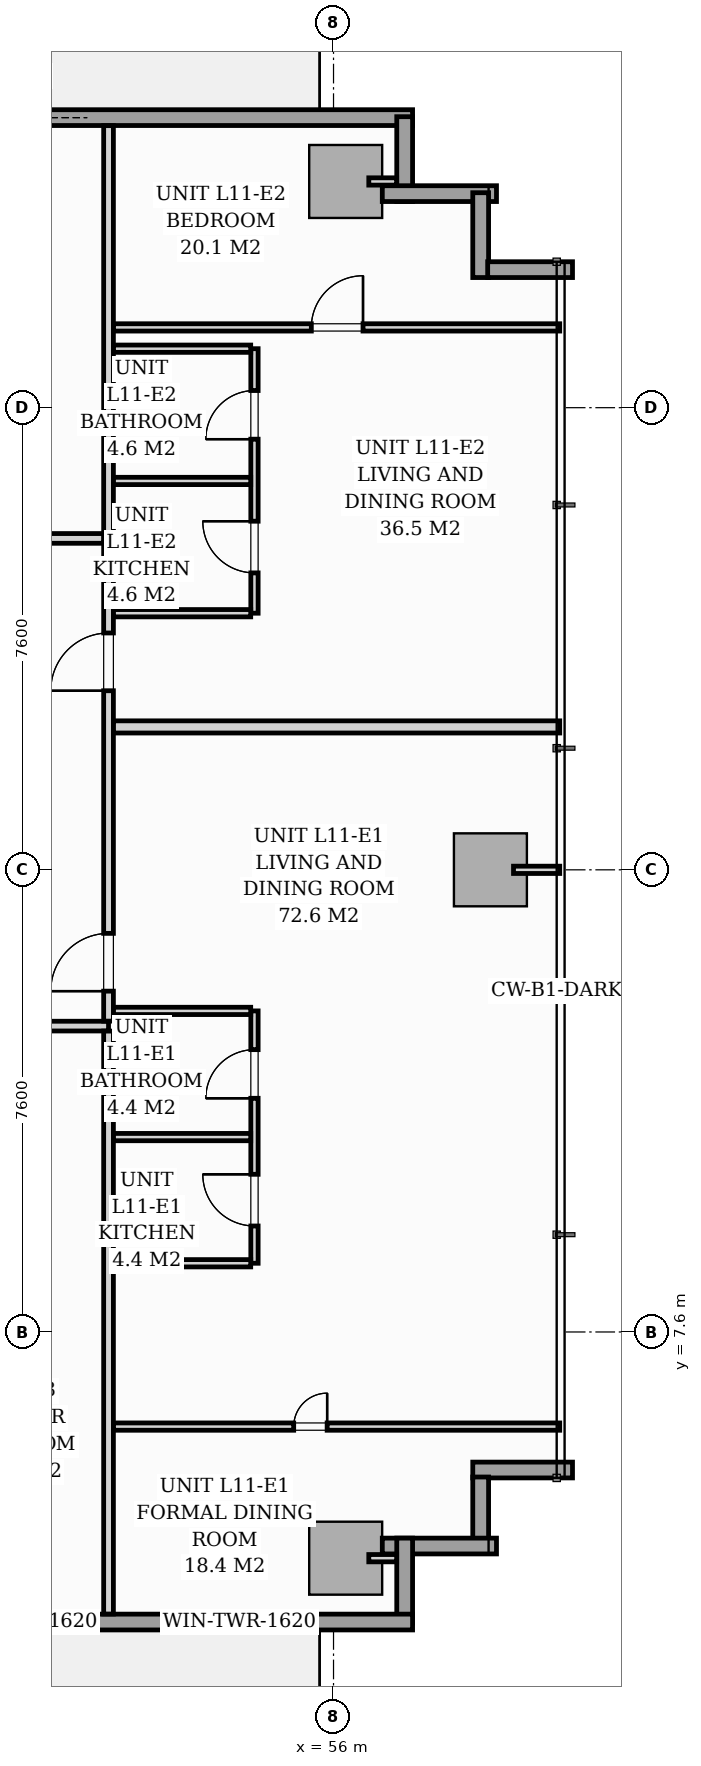
"""IFC4 building model, lengths in metres.
Left out: names, types, materials, properties, quantities, classifications, styles, units other than length and angle.
Written with IfcOpenShell. Run it as: python <this file> out.ifc"""

import sys

from ifc_helpers import new_model, si_unit, direction, frame, frame_2d, origin, origin_2d, place, context, subcontext, project, spatial, rectangle, extrude, source, transform, mapped, element, fill, save


model = new_model("IFC4")
c1 = context("Model", 3, precision=1e-05, world=origin(), true_north=direction((0.0, 1.0)))
c2 = subcontext(c1, "Body", "Model", "MODEL_VIEW")
j1 = project(units=[si_unit("LENGTHUNIT", "METRE"), si_unit("PLANEANGLEUNIT", "RADIAN")], contexts=[c1])
p1 = place(None, origin())
s1 = spatial("IfcSite", under=j1, at=p1, CompositionType="ELEMENT")
p2 = place(p1, origin())
s2 = spatial("IfcBuilding", under=s1, at=p2, CompositionType="ELEMENT")
p3 = place(p2, frame((0.0, 0.0, 42.2)))
s3 = spatial("IfcBuildingStorey", under=s2, at=p3, CompositionType="ELEMENT", Elevation=42.2)
m1 = source(origin(), c2, "Body", "SweptSolid", [
    extrude(rectangle(XDim=1.2, YDim=1.2, at=origin_2d()), origin(), (0.0, 0.0, 1.0), 3.196),
])
for number, where, z_axis, x_axis in (
    (1, (56.2, 3.88, 0.002), (0.0, 0.0, 1.0), (1.0, 0.0, 0.0)),
    (2, (56.2, 26.52, 0.002), (0.0, 0.0, 1.0), (1.0, 0.0, 0.0)),
    (3, (58.58, 15.2, 0.002), (0.0, 0.0, 1.0), (1.0, 0.0, 0.0)),
):
    element("IfcColumn", number, at=place(p3, frame(where, z_axis=z_axis, x_axis=x_axis)), inside=s3, PredefinedType="COLUMN", context=c2, shape_type="MappedRepresentation", body=[
        mapped(m1, transform((0.0, 0.0, 0.0), scale=1.0)),
    ])
p4 = place(p3, frame((40.15, 27.57, 0.0), z_axis=(0.0, 0.0, 1.0), x_axis=(1.0, 0.0, 0.0)))
e4 = element("IfcWall", 4, at=p4, inside=s3, PredefinedType="STANDARD", context=c2, shape_type="SweptSolid", body=[
    extrude(rectangle(XDim=17.15, YDim=0.26, at=frame_2d((8.575, 0.0))), origin(), (0.0, 0.0, 1.0), 2.94),
])
p5 = place(p4, frame((9.19, 0.0, 0.0)))
e5 = element("IfcOpeningElement", 5, at=p5, cuts=e4, PredefinedType="OPENING", context=c2, shape_type="SweptSolid", body=[
    extrude(rectangle(XDim=1.8, YDim=2.06, at=frame_2d((0.9, 1.03))), frame((0.0, 0.14, 0.0), z_axis=(0.0, -1.0, 0.0), x_axis=(1.0, 0.0, 0.0)), (0.0, 0.0, 1.0), 0.28),
])
p6 = place(p4, frame((0.7, 0.0, 0.65)))
e6 = element("IfcOpeningElement", 6, at=p6, cuts=e4, PredefinedType="OPENING", context=c2, shape_type="SweptSolid", body=[
    extrude(rectangle(XDim=1.6, YDim=1.5, at=frame_2d((0.8, 0.75))), frame((0.0, 0.14, 0.0), z_axis=(0.0, -1.0, 0.0), x_axis=(1.0, 0.0, 0.0)), (0.0, 0.0, 1.0), 0.28),
])
p7 = place(p3, frame((57.17, 27.585, 0.0), z_axis=(0.0, 0.0, 1.0), x_axis=(0.0, -1.0, 0.0)))
e7 = element("IfcWall", 7, at=p7, inside=s3, PredefinedType="STANDARD", context=c2, shape_type="SweptSolid", body=[
    extrude(rectangle(XDim=1.395, YDim=0.26, at=frame_2d((0.698, 0.0))), origin(), (0.0, 0.0, 1.0), 2.94),
])
p8 = place(p3, frame((56.802, 26.32, 0.0), z_axis=(0.0, 0.0, 1.0), x_axis=(1.0, 0.0, 0.0)))
e8 = element("IfcWall", 8, at=p8, inside=s3, PredefinedType="STANDARD", context=c2, shape_type="SweptSolid", body=[
    extrude(rectangle(XDim=1.878, YDim=0.26, at=frame_2d((0.939, 0.0))), origin(), (0.0, 0.0, 1.0), 2.94),
])
for number, where, z_axis, x_axis in (
    (9, (58.42, 26.335, 0.0), (0.0, 0.0, 1.0), (0.0, -1.0, 0.0)),
    (10, (58.535, 25.07, 0.0), (0.0, 0.0, 1.0), (1.0, 0.0, 0.0)),
):
    element("IfcWall", number, at=place(p3, frame(where, z_axis=z_axis, x_axis=x_axis)), inside=s3, PredefinedType="STANDARD", context=c2, shape_type="SweptSolid", body=[
        extrude(rectangle(XDim=1.395, YDim=0.26, at=frame_2d((0.698, 0.0))), origin(), (0.0, 0.0, 1.0), 2.94),
    ])
p9 = place(p3, frame((59.93, 5.33, 0.0), z_axis=(0.0, 0.0, 1.0), x_axis=(-1.0, 0.0, 0.0)))
e11 = element("IfcWall", 11, at=p9, inside=s3, PredefinedType="STANDARD", context=c2, shape_type="SweptSolid", body=[
    extrude(rectangle(XDim=1.64, YDim=0.26, at=frame_2d((0.82, 0.0))), origin(), (0.0, 0.0, 1.0), 2.94),
])
p10 = place(p3, frame((58.42, 5.215, 0.0), z_axis=(0.0, 0.0, 1.0), x_axis=(0.0, -1.0, 0.0)))
e12 = element("IfcWall", 12, at=p10, inside=s3, PredefinedType="STANDARD", context=c2, shape_type="SweptSolid", body=[
    extrude(rectangle(XDim=1.15, YDim=0.26, at=frame_2d((0.575, 0.0))), origin(), (0.0, 0.0, 1.0), 2.94),
])
p11 = place(p3, frame((58.68, 4.08, 0.0), z_axis=(0.0, 0.0, 1.0), x_axis=(-1.0, 0.0, 0.0)))
e13 = element("IfcWall", 13, at=p11, inside=s3, PredefinedType="STANDARD", context=c2, shape_type="SweptSolid", body=[
    extrude(rectangle(XDim=1.878, YDim=0.26, at=frame_2d((0.939, 0.0))), origin(), (0.0, 0.0, 1.0), 2.94),
])
p12 = place(p3, frame((57.17, 4.21, 0.0), z_axis=(0.0, 0.0, 1.0), x_axis=(0.0, -1.0, 0.0)))
e14 = element("IfcWall", 14, at=p12, inside=s3, PredefinedType="STANDARD", context=c2, shape_type="SweptSolid", body=[
    extrude(rectangle(XDim=1.395, YDim=0.26, at=frame_2d((0.698, 0.0))), origin(), (0.0, 0.0, 1.0), 2.94),
])
p13 = place(p3, frame((57.3, 2.83, 0.0), z_axis=(0.0, 0.0, 1.0), x_axis=(-1.0, 0.0, 0.0)))
e15 = element("IfcWall", 15, at=p13, inside=s3, PredefinedType="STANDARD", context=c2, shape_type="SweptSolid", body=[
    extrude(rectangle(XDim=17.15, YDim=0.26, at=frame_2d((8.575, 0.0))), origin(), (0.0, 0.0, 1.0), 2.94),
])
p14 = place(p13, frame((8.308, 0.0, 0.0)))
e16 = element("IfcOpeningElement", 16, at=p14, cuts=e15, PredefinedType="OPENING", context=c2, shape_type="SweptSolid", body=[
    extrude(rectangle(XDim=1.8, YDim=2.06, at=frame_2d((0.9, 1.03))), frame((0.0, 0.14, 0.0), z_axis=(0.0, -1.0, 0.0), x_axis=(1.0, 0.0, 0.0)), (0.0, 0.0, 1.0), 0.28),
])
p15 = place(p13, frame((2.05, 0.0, 0.65)))
e17 = element("IfcOpeningElement", 17, at=p15, cuts=e15, PredefinedType="OPENING", context=c2, shape_type="SweptSolid", body=[
    extrude(rectangle(XDim=1.6, YDim=1.5, at=frame_2d((0.8, 0.75))), frame((0.0, 0.14, 0.0), z_axis=(0.0, -1.0, 0.0), x_axis=(1.0, 0.0, 0.0)), (0.0, 0.0, 1.0), 0.28),
])
p16 = place(p13, frame((5.644, 0.0, 0.75)))
e18 = element("IfcOpeningElement", 18, at=p16, cuts=e15, PredefinedType="OPENING", context=c2, shape_type="SweptSolid", body=[
    extrude(rectangle(XDim=1.6, YDim=1.5, at=frame_2d((0.8, 0.75))), frame((0.0, 0.14, 0.0), z_axis=(0.0, -1.0, 0.0), x_axis=(1.0, 0.0, 0.0)), (0.0, 0.0, 1.0), 0.28),
])
p17 = place(p3, frame((15.2, 12.63, 0.0), z_axis=(0.0, 0.0, 1.0), x_axis=(1.0, 0.0, 0.0)))
e19 = element("IfcWall", 19, at=p17, inside=s3, PredefinedType="PARTITIONING", context=c2, shape_type="SweptSolid", body=[
    extrude(rectangle(XDim=37.1, YDim=0.16, at=frame_2d((18.55, 0.0))), origin(), (0.0, 0.0, 1.0), 2.94),
])
p18 = place(p17, frame((1.572, 0.0, 0.0)))
e20 = element("IfcOpeningElement", 20, at=p18, cuts=e19, PredefinedType="OPENING", context=c2, shape_type="SweptSolid", body=[
    extrude(rectangle(XDim=0.95, YDim=2.06, at=frame_2d((0.475, 1.03))), frame((0.0, 0.09, 0.0), z_axis=(0.0, -1.0, 0.0), x_axis=(1.0, 0.0, 0.0)), (0.0, 0.0, 1.0), 0.18),
])
p19 = place(p17, frame((14.877, 0.0, 0.0)))
e21 = element("IfcOpeningElement", 21, at=p19, cuts=e19, PredefinedType="OPENING", context=c2, shape_type="SweptSolid", body=[
    extrude(rectangle(XDim=0.95, YDim=2.06, at=frame_2d((0.475, 1.03))), frame((0.0, 0.09, 0.0), z_axis=(0.0, -1.0, 0.0), x_axis=(1.0, 0.0, 0.0)), (0.0, 0.0, 1.0), 0.18),
])
p20 = place(p17, frame((28.476, 0.0, 0.0)))
e22 = element("IfcOpeningElement", 22, at=p20, cuts=e19, PredefinedType="OPENING", context=c2, shape_type="SweptSolid", body=[
    extrude(rectangle(XDim=0.95, YDim=2.06, at=frame_2d((0.475, 1.03))), frame((0.0, 0.09, 0.0), z_axis=(0.0, -1.0, 0.0), x_axis=(1.0, 0.0, 0.0)), (0.0, 0.0, 1.0), 0.18),
])
p21 = place(p3, frame((52.3, 2.962, 0.0), z_axis=(0.0, 0.0, 1.0), x_axis=(0.0, 1.0, 0.0)))
e23 = element("IfcWall", 23, at=p21, inside=s3, PredefinedType="PARTITIONING", context=c2, shape_type="SweptSolid", body=[
    extrude(rectangle(XDim=9.586, YDim=0.16, at=frame_2d((4.793, 0.0))), origin(), (0.0, 0.0, 1.0), 2.94),
])
p22 = place(p3, frame((52.3, 12.712, 0.0), z_axis=(0.0, 0.0, 1.0), x_axis=(0.0, 1.0, 0.0)))
e24 = element("IfcWall", 24, at=p22, inside=s3, PredefinedType="PARTITIONING", context=c2, shape_type="SweptSolid", body=[
    extrude(rectangle(XDim=14.726, YDim=0.16, at=frame_2d((7.363, 0.0))), origin(), (0.0, 0.0, 1.0), 2.94),
])
p23 = place(p22, frame((0.493, 0.0, 0.0)))
e25 = element("IfcOpeningElement", 25, at=p23, cuts=e24, PredefinedType="OPENING", context=c2, shape_type="SweptSolid", body=[
    extrude(rectangle(XDim=0.95, YDim=2.06, at=frame_2d((0.475, 1.03))), frame((0.0, 0.09, 0.0), z_axis=(0.0, -1.0, 0.0), x_axis=(1.0, 0.0, 0.0)), (0.0, 0.0, 1.0), 0.18),
])
p24 = place(p22, frame((5.433, 0.0, 0.0)))
e26 = element("IfcOpeningElement", 26, at=p24, cuts=e24, PredefinedType="OPENING", context=c2, shape_type="SweptSolid", body=[
    extrude(rectangle(XDim=0.95, YDim=2.06, at=frame_2d((0.475, 1.03))), frame((0.0, 0.09, 0.0), z_axis=(0.0, -1.0, 0.0), x_axis=(1.0, 0.0, 0.0)), (0.0, 0.0, 1.0), 0.18),
])
p25 = place(p3, frame((52.382, 17.55, 0.0), z_axis=(0.0, 0.0, 1.0), x_axis=(1.0, 0.0, 0.0)))
e27 = element("IfcWall", 27, at=p25, inside=s3, PredefinedType="PARTITIONING", context=c2, shape_type="SweptSolid", body=[
    extrude(rectangle(XDim=7.338, YDim=0.2, at=frame_2d((3.669, 0.0))), origin(), (0.0, 0.0, 1.0), 2.94),
])
p26 = place(p3, frame((54.7, 8.73, 0.0), z_axis=(0.0, 0.0, 1.0), x_axis=(0.0, 1.0, 0.0)))
e28 = element("IfcWall", 28, at=p26, inside=s3, PredefinedType="PARTITIONING", context=c2, shape_type="SweptSolid", body=[
    extrude(rectangle(XDim=4.15, YDim=0.12, at=frame_2d((2.075, 0.0))), origin(), (0.0, 0.0, 1.0), 2.94),
])
p27 = place(p26, frame((0.613, 0.0, 0.0)))
e29 = element("IfcOpeningElement", 29, at=p27, cuts=e28, PredefinedType="OPENING", context=c2, shape_type="SweptSolid", body=[
    extrude(rectangle(XDim=0.85, YDim=2.05, at=frame_2d((0.425, 1.025))), frame((0.0, 0.07, 0.0), z_axis=(0.0, -1.0, 0.0), x_axis=(1.0, 0.0, 0.0)), (0.0, 0.0, 1.0), 0.14),
])
p28 = place(p26, frame((2.713, 0.0, 0.0)))
e30 = element("IfcOpeningElement", 30, at=p28, cuts=e28, PredefinedType="OPENING", context=c2, shape_type="SweptSolid", body=[
    extrude(rectangle(XDim=0.8, YDim=2.02, at=frame_2d((0.4, 1.01))), frame((0.0, 0.07, 0.0), z_axis=(0.0, -1.0, 0.0), x_axis=(1.0, 0.0, 0.0)), (0.0, 0.0, 1.0), 0.14),
])
for number, where, z_axis, x_axis in (
    (31, (52.382, 10.805, 0.0), (0.0, 0.0, 1.0), (1.0, 0.0, 0.0)),
    (32, (52.382, 8.73, 0.0), (0.0, 0.0, 1.0), (1.0, 0.0, 0.0)),
    (33, (52.382, 12.88, 0.0), (0.0, 0.0, 1.0), (1.0, 0.0, 0.0)),
):
    element("IfcWall", number, at=place(p3, frame(where, z_axis=z_axis, x_axis=x_axis)), inside=s3, PredefinedType="PARTITIONING", context=c2, shape_type="SweptSolid", body=[
        extrude(rectangle(XDim=2.256, YDim=0.12, at=frame_2d((1.128, 0.0))), origin(), (0.0, 0.0, 1.0), 2.94),
    ])
p29 = place(p3, frame((52.382, 6.044, 0.0), z_axis=(0.0, 0.0, 1.0), x_axis=(1.0, 0.0, 0.0)))
e34 = element("IfcWall", 34, at=p29, inside=s3, PredefinedType="PARTITIONING", context=c2, shape_type="SweptSolid", body=[
    extrude(rectangle(XDim=7.338, YDim=0.12, at=frame_2d((3.669, 0.0))), origin(), (0.0, 0.0, 1.0), 2.94),
])
p30 = place(p29, frame((2.963, 0.0, 0.0)))
e35 = element("IfcOpeningElement", 35, at=p30, cuts=e34, PredefinedType="OPENING", context=c2, shape_type="SweptSolid", body=[
    extrude(rectangle(XDim=0.55, YDim=2.0, at=frame_2d((0.275, 1.0))), frame((0.0, 0.07, 0.0), z_axis=(0.0, -1.0, 0.0), x_axis=(1.0, 0.0, 0.0)), (0.0, 0.0, 1.0), 0.14),
])
p31 = place(p3, frame((54.7, 19.42, 0.0), z_axis=(0.0, 0.0, 1.0), x_axis=(0.0, 1.0, 0.0)))
e36 = element("IfcWall", 36, at=p31, inside=s3, PredefinedType="PARTITIONING", context=c2, shape_type="SweptSolid", body=[
    extrude(rectangle(XDim=4.35, YDim=0.12, at=frame_2d((2.175, 0.0))), origin(), (0.0, 0.0, 1.0), 2.94),
])
p32 = place(p31, frame((0.663, 0.0, 0.0)))
e37 = element("IfcOpeningElement", 37, at=p32, cuts=e36, PredefinedType="OPENING", context=c2, shape_type="SweptSolid", body=[
    extrude(rectangle(XDim=0.85, YDim=2.05, at=frame_2d((0.425, 1.025))), frame((0.0, 0.07, 0.0), z_axis=(0.0, -1.0, 0.0), x_axis=(1.0, 0.0, 0.0)), (0.0, 0.0, 1.0), 0.14),
])
p33 = place(p31, frame((2.862, 0.0, 0.0)))
e38 = element("IfcOpeningElement", 38, at=p33, cuts=e36, PredefinedType="OPENING", context=c2, shape_type="SweptSolid", body=[
    extrude(rectangle(XDim=0.8, YDim=2.02, at=frame_2d((0.4, 1.01))), frame((0.0, 0.07, 0.0), z_axis=(0.0, -1.0, 0.0), x_axis=(1.0, 0.0, 0.0)), (0.0, 0.0, 1.0), 0.14),
])
for number, where, z_axis, x_axis in (
    (39, (52.382, 21.595, 0.0), (0.0, 0.0, 1.0), (1.0, 0.0, 0.0)),
    (40, (52.382, 19.42, 0.0), (0.0, 0.0, 1.0), (1.0, 0.0, 0.0)),
    (41, (52.382, 23.77, 0.0), (0.0, 0.0, 1.0), (1.0, 0.0, 0.0)),
):
    element("IfcWall", number, at=place(p3, frame(where, z_axis=z_axis, x_axis=x_axis)), inside=s3, PredefinedType="PARTITIONING", context=c2, shape_type="SweptSolid", body=[
        extrude(rectangle(XDim=2.256, YDim=0.12, at=frame_2d((1.128, 0.0))), origin(), (0.0, 0.0, 1.0), 2.94),
    ])
p34 = place(p3, frame((52.382, 24.12, 0.0), z_axis=(0.0, 0.0, 1.0), x_axis=(1.0, 0.0, 0.0)))
e42 = element("IfcWall", 42, at=p34, inside=s3, PredefinedType="PARTITIONING", context=c2, shape_type="SweptSolid", body=[
    extrude(rectangle(XDim=7.338, YDim=0.12, at=frame_2d((3.669, 0.0))), origin(), (0.0, 0.0, 1.0), 2.94),
])
p35 = place(p34, frame((3.253, 0.0, 0.0)))
e43 = element("IfcOpeningElement", 43, at=p35, cuts=e42, PredefinedType="OPENING", context=c2, shape_type="SweptSolid", body=[
    extrude(rectangle(XDim=0.85, YDim=2.05, at=frame_2d((0.425, 1.025))), frame((0.0, 0.07, 0.0), z_axis=(0.0, -1.0, 0.0), x_axis=(1.0, 0.0, 0.0)), (0.0, 0.0, 1.0), 0.14),
])
p36 = place(p3, frame((50.432, 20.65, 0.0), z_axis=(0.0, 0.0, 1.0), x_axis=(1.0, 0.0, 0.0)))
e44 = element("IfcWall", 44, at=p36, inside=s3, PredefinedType="PARTITIONING", context=c2, shape_type="SweptSolid", body=[
    extrude(rectangle(XDim=1.786, YDim=0.16, at=frame_2d((0.893, 0.0))), origin(), (0.0, 0.0, 1.0), 2.94),
])
for number, where, z_axis, x_axis in (
    (45, (56.58, 3.88, 0.0), (0.0, 0.0, 1.0), (1.0, 0.0, 0.0)),
    (46, (56.58, 26.52, 0.0), (0.0, 0.0, 1.0), (1.0, 0.0, 0.0)),
):
    element("IfcWall", number, at=place(p3, frame(where, z_axis=z_axis, x_axis=x_axis)), inside=s3, PredefinedType="PARTITIONING", context=c2, shape_type="SweptSolid", body=[
        extrude(rectangle(XDim=0.458, YDim=0.12, at=frame_2d((0.229, 0.0))), origin(), (0.0, 0.0, 1.0), 2.94),
    ])
p37 = place(p3, frame((58.96, 15.2, 0.0), z_axis=(0.0, 0.0, 1.0), x_axis=(1.0, 0.0, 0.0)))
e47 = element("IfcWall", 47, at=p37, inside=s3, PredefinedType="PARTITIONING", context=c2, shape_type="SweptSolid", body=[
    extrude(rectangle(XDim=0.76, YDim=0.12, at=frame_2d((0.38, 0.0))), origin(), (0.0, 0.0, 1.0), 2.94),
])
m2 = source(origin(), c2, "Body", "SweptSolid", [
    extrude(rectangle(XDim=1.6, YDim=1.5, at=frame_2d((0.8, 0.75))), frame((0.0, 0.03, 0.0), z_axis=(0.0, -1.0, 0.0), x_axis=(1.0, 0.0, 0.0)), (0.0, 0.0, 1.0), 0.06),
])
p38 = place(p15, origin())
e48 = element("IfcWindow", 48, at=p38, inside=s3, PartitioningType="SINGLE_PANEL", PredefinedType="WINDOW", context=c2, shape_type="MappedRepresentation", body=[
    mapped(m2, transform((0.0, 0.0, 0.0), scale=1.0)),
])
fill(e17, e48)
p39 = place(p16, origin())
e49 = element("IfcWindow", 49, at=p39, inside=s3, PartitioningType="SINGLE_PANEL", PredefinedType="WINDOW", context=c2, shape_type="MappedRepresentation", body=[
    mapped(m2, transform((0.0, 0.0, 0.0), scale=1.0)),
])
fill(e18, e49)
m3 = source(origin(), c2, "Body", "SweptSolid", [
    extrude(rectangle(XDim=0.95, YDim=2.06, at=frame_2d((0.475, 1.03))), frame((0.0, 0.025, 0.0), z_axis=(0.0, -1.0, 0.0), x_axis=(1.0, 0.0, 0.0)), (0.0, 0.0, 1.0), 0.05),
])
p40 = place(p23, origin())
e50 = element("IfcDoor", 50, at=p40, inside=s3, OperationType="SINGLE_SWING_LEFT", PredefinedType="DOOR", context=c2, shape_type="MappedRepresentation", body=[
    mapped(m3, transform((0.0, 0.0, 0.0), scale=1.0)),
])
fill(e25, e50)
m4 = source(origin(), c2, "Body", "SweptSolid", [
    extrude(rectangle(XDim=0.85, YDim=2.05, at=frame_2d((0.425, 1.025))), frame((0.0, 0.025, 0.0), z_axis=(0.0, -1.0, 0.0), x_axis=(1.0, 0.0, 0.0)), (0.0, 0.0, 1.0), 0.05),
])
p41 = place(p27, origin())
e51 = element("IfcDoor", 51, at=p41, inside=s3, OperationType="SINGLE_SWING_RIGHT", PredefinedType="DOOR", context=c2, shape_type="MappedRepresentation", body=[
    mapped(m4, transform((0.0, 0.0, 0.0), scale=1.0)),
])
fill(e29, e51)
m5 = source(origin(), c2, "Body", "SweptSolid", [
    extrude(rectangle(XDim=0.8, YDim=2.02, at=frame_2d((0.4, 1.01))), frame((0.0, 0.025, 0.0), z_axis=(0.0, -1.0, 0.0), x_axis=(1.0, 0.0, 0.0)), (0.0, 0.0, 1.0), 0.05),
])
p42 = place(p28, origin())
e52 = element("IfcDoor", 52, at=p42, inside=s3, OperationType="SINGLE_SWING_LEFT", PredefinedType="DOOR", context=c2, shape_type="MappedRepresentation", body=[
    mapped(m5, transform((0.0, 0.0, 0.0), scale=1.0)),
])
fill(e30, e52)
m6 = source(origin(), c2, "Body", "SweptSolid", [
    extrude(rectangle(XDim=0.55, YDim=2.0, at=frame_2d((0.275, 1.0))), frame((0.0, 0.025, 0.0), z_axis=(0.0, -1.0, 0.0), x_axis=(1.0, 0.0, 0.0)), (0.0, 0.0, 1.0), 0.05),
])
p43 = place(p30, origin())
e53 = element("IfcDoor", 53, at=p43, inside=s3, OperationType="SINGLE_SWING_RIGHT", PredefinedType="DOOR", context=c2, shape_type="MappedRepresentation", body=[
    mapped(m6, transform((0.0, 0.0, 0.0), scale=1.0)),
])
fill(e35, e53)
p44 = place(p24, origin())
e54 = element("IfcDoor", 54, at=p44, inside=s3, OperationType="SINGLE_SWING_LEFT", PredefinedType="DOOR", context=c2, shape_type="MappedRepresentation", body=[
    mapped(m3, transform((0.0, 0.0, 0.0), scale=1.0)),
])
fill(e26, e54)
p45 = place(p32, origin())
e55 = element("IfcDoor", 55, at=p45, inside=s3, OperationType="SINGLE_SWING_RIGHT", PredefinedType="DOOR", context=c2, shape_type="MappedRepresentation", body=[
    mapped(m4, transform((0.0, 0.0, 0.0), scale=1.0)),
])
fill(e37, e55)
p46 = place(p33, origin())
e56 = element("IfcDoor", 56, at=p46, inside=s3, OperationType="SINGLE_SWING_LEFT", PredefinedType="DOOR", context=c2, shape_type="MappedRepresentation", body=[
    mapped(m5, transform((0.0, 0.0, 0.0), scale=1.0)),
])
fill(e38, e56)
p47 = place(p35, origin())
e57 = element("IfcDoor", 57, at=p47, inside=s3, OperationType="SINGLE_SWING_RIGHT", PredefinedType="DOOR", context=c2, shape_type="MappedRepresentation", body=[
    mapped(m4, transform((0.0, 0.0, 0.0), scale=1.0)),
])
fill(e43, e57)
save(model, sys.argv[1])
